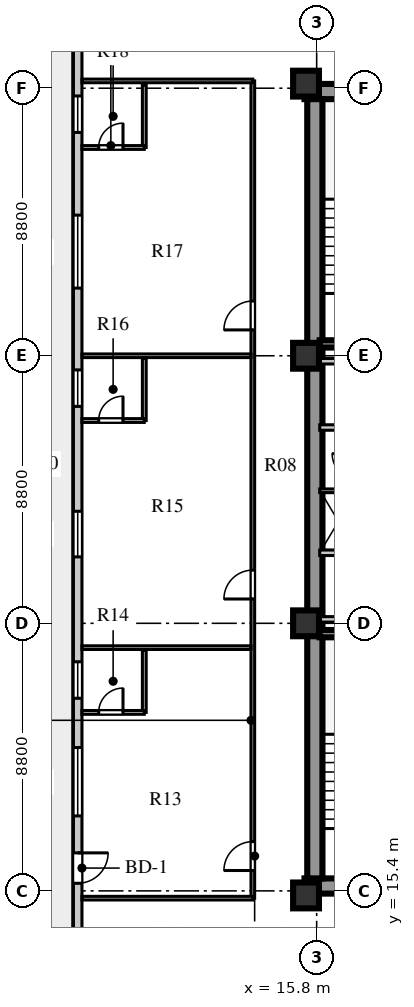
"""IFC4 building model, lengths in metres.
Left out: names, types, materials, properties, quantities, classifications, styles, units other than length and angle.
Written with IfcOpenShell. Run it as: python <this file> out.ifc"""

import sys

from ifc_helpers import new_model, si_unit, direction, frame, frame_2d, origin, origin_2d, place, context, subcontext, project, spatial, rectangle, extrude, element, fill, save


model = new_model("IFC4")
c1 = context("Model", 3, precision=1e-05, world=origin(), true_north=direction((0.0, 1.0)))
c2 = subcontext(c1, "Body", "Model", "MODEL_VIEW")
j1 = project(units=[si_unit("LENGTHUNIT", "METRE"), si_unit("PLANEANGLEUNIT", "RADIAN")], contexts=[c1])
p1 = place(None, origin())
s1 = spatial("IfcSite", under=j1, at=p1, CompositionType="ELEMENT")
p2 = place(p1, origin())
s2 = spatial("IfcBuilding", under=s1, at=p2, CompositionType="ELEMENT")
p3 = place(p2, frame((0.0, 0.0, 173.3)))
s3 = spatial("IfcBuildingStorey", under=s2, at=p3, CompositionType="ELEMENT", Elevation=173.3)
for number, where, z_axis, x_axis in (
    (1, (15.4, 15.56, 0.0), (0.0, 0.0, 1.0), (1.0, 0.0, 0.0)),
    (2, (15.4, 41.69, 0.0), (0.0, 0.0, 1.0), (1.0, 0.0, 0.0)),
):
    element("IfcWall", number, at=place(p3, frame(where, z_axis=z_axis, x_axis=x_axis)), inside=s3, PredefinedType="SHEAR", context=c2, shape_type="SweptSolid", body=[
        extrude(rectangle(XDim=9.68, YDim=0.5, at=frame_2d((4.84, 0.0))), origin(), (0.0, 0.0, 1.0), 3.6),
    ])
p4 = place(p3, frame((15.74, 15.81, 0.0), z_axis=(0.0, 0.0, 1.0), x_axis=(0.0, 1.0, 0.0)))
e3 = element("IfcWall", 3, at=p4, inside=s3, PredefinedType="SHEAR", context=c2, shape_type="SweptSolid", body=[
    extrude(rectangle(XDim=25.63, YDim=0.5, at=frame_2d((12.815, 0.0))), origin(), (0.0, 0.0, 1.0), 3.6),
])
for number, where, z_axis, x_axis in (
    (4, (15.45, 15.25, 0.0), (0.0, 0.0, 1.0), (1.0, 0.0, 0.0)),
    (5, (15.45, 24.2, 0.0), (0.0, 0.0, 1.0), (1.0, 0.0, 0.0)),
    (6, (15.45, 33.0, 0.0), (0.0, 0.0, 1.0), (1.0, 0.0, 0.0)),
    (7, (15.45, 41.95, 0.0), (0.0, 0.0, 1.0), (1.0, 0.0, 0.0)),
):
    element("IfcColumn", number, at=place(p3, frame(where, z_axis=z_axis, x_axis=x_axis)), inside=s3, PredefinedType="COLUMN", context=c2, shape_type="SweptSolid", body=[
        extrude(rectangle(XDim=0.85, YDim=0.85, at=origin_2d()), origin(), (0.0, 0.0, 1.0), 3.6),
    ])
p5 = place(p3, frame((7.94, 44.07, 0.0), z_axis=(0.0, 0.0, 1.0), x_axis=(0.0, -1.0, 0.0)))
e8 = element("IfcWall", 8, at=p5, inside=s3, PredefinedType="STANDARD", context=c2, shape_type="SweptSolid", body=[
    extrude(rectangle(XDim=30.94, YDim=0.28, at=frame_2d((15.47, 0.0))), origin(), (0.0, 0.0, 1.0), 3.6),
])
p6 = place(p5, frame((27.42, 0.0, 0.0)))
e9 = element("IfcOpeningElement", 9, at=p6, cuts=e8, PredefinedType="OPENING", context=c2, shape_type="SweptSolid", body=[
    extrude(rectangle(XDim=1.0, YDim=2.05, at=frame_2d((0.5, 1.025))), frame((0.0, 0.15, 0.0), z_axis=(0.0, -1.0, 0.0), x_axis=(1.0, 0.0, 0.0)), (0.0, 0.0, 1.0), 0.3),
])
p7 = place(p5, frame((23.955, 0.0, 0.8)))
e10 = element("IfcOpeningElement", 10, at=p7, cuts=e8, PredefinedType="OPENING", context=c2, shape_type="SweptSolid", body=[
    extrude(rectangle(XDim=2.25, YDim=2.0, at=frame_2d((1.125, 1.0))), frame((0.0, 0.15, 0.0), z_axis=(0.0, -1.0, 0.0), x_axis=(1.0, 0.0, 0.0)), (0.0, 0.0, 1.0), 0.3),
])
p8 = place(p5, frame((21.135, 0.0, 0.8)))
e11 = element("IfcOpeningElement", 11, at=p8, cuts=e8, PredefinedType="OPENING", context=c2, shape_type="SweptSolid", body=[
    extrude(rectangle(XDim=1.2, YDim=1.75, at=frame_2d((0.6, 0.875))), frame((0.0, 0.15, 0.0), z_axis=(0.0, -1.0, 0.0), x_axis=(1.0, 0.0, 0.0)), (0.0, 0.0, 1.0), 0.3),
])
p9 = place(p5, frame((16.185, 0.0, 0.8)))
e12 = element("IfcOpeningElement", 12, at=p9, cuts=e8, PredefinedType="OPENING", context=c2, shape_type="SweptSolid", body=[
    extrude(rectangle(XDim=1.5, YDim=2.0, at=frame_2d((0.75, 1.0))), frame((0.0, 0.15, 0.0), z_axis=(0.0, -1.0, 0.0), x_axis=(1.0, 0.0, 0.0)), (0.0, 0.0, 1.0), 0.3),
])
p10 = place(p5, frame((11.535, 0.0, 0.8)))
e13 = element("IfcOpeningElement", 13, at=p10, cuts=e8, PredefinedType="OPENING", context=c2, shape_type="SweptSolid", body=[
    extrude(rectangle(XDim=1.2, YDim=1.75, at=frame_2d((0.6, 0.875))), frame((0.0, 0.15, 0.0), z_axis=(0.0, -1.0, 0.0), x_axis=(1.0, 0.0, 0.0)), (0.0, 0.0, 1.0), 0.3),
])
p11 = place(p5, frame((6.445, 0.0, 0.8)))
e14 = element("IfcOpeningElement", 14, at=p11, cuts=e8, PredefinedType="OPENING", context=c2, shape_type="SweptSolid", body=[
    extrude(rectangle(XDim=2.4, YDim=2.05, at=frame_2d((1.2, 1.025))), frame((0.0, 0.15, 0.0), z_axis=(0.0, -1.0, 0.0), x_axis=(1.0, 0.0, 0.0)), (0.0, 0.0, 1.0), 0.3),
])
p12 = place(p5, frame((2.525, 0.0, 0.8)))
e15 = element("IfcOpeningElement", 15, at=p12, cuts=e8, PredefinedType="OPENING", context=c2, shape_type="SweptSolid", body=[
    extrude(rectangle(XDim=1.2, YDim=1.75, at=frame_2d((0.6, 0.875))), frame((0.0, 0.15, 0.0), z_axis=(0.0, -1.0, 0.0), x_axis=(1.0, 0.0, 0.0)), (0.0, 0.0, 1.0), 0.3),
])
p13 = place(p3, frame((15.9, 23.86, 0.0), z_axis=(0.0, 0.0, 1.0), x_axis=(1.0, 0.0, 0.0)))
e16 = element("IfcWall", 16, at=p13, inside=s3, PredefinedType="SHEAR", context=c2, shape_type="SweptSolid", body=[
    extrude(rectangle(XDim=3.52, YDim=0.24, at=frame_2d((1.76, 0.0))), origin(), (0.0, 0.0, 1.0), 3.85),
])
p14 = place(p3, frame((15.9, 26.52, 0.0), z_axis=(0.0, 0.0, 1.0), x_axis=(1.0, 0.0, 0.0)))
e17 = element("IfcWall", 17, at=p14, inside=s3, PredefinedType="SOLIDWALL", context=c2, shape_type="SweptSolid", body=[
    extrude(rectangle(XDim=8.68, YDim=0.18, at=frame_2d((4.34, 0.0))), origin(), (0.0, 0.0, 1.0), 3.6),
])
p15 = place(p14, frame((3.3, 0.0, 0.0)))
e18 = element("IfcOpeningElement", 18, at=p15, cuts=e17, PredefinedType="OPENING", context=c2, shape_type="SweptSolid", body=[
    extrude(rectangle(XDim=0.95, YDim=2.1, at=frame_2d((0.475, 1.05))), frame((0.0, 0.1, 0.0), z_axis=(0.0, -1.0, 0.0), x_axis=(1.0, 0.0, 0.0)), (0.0, 0.0, 1.0), 0.2),
])
p16 = place(p3, frame((15.9, 24.33, 0.0), z_axis=(0.0, 0.0, 1.0), x_axis=(1.0, 0.0, 0.0)))
e19 = element("IfcWall", 19, at=p16, inside=s3, PredefinedType="SOLIDWALL", context=c2, shape_type="SweptSolid", body=[
    extrude(rectangle(XDim=8.68, YDim=0.18, at=frame_2d((4.34, 0.0))), origin(), (0.0, 0.0, 1.0), 2.95),
])
p17 = place(p3, frame((15.9, 28.56, 0.0), z_axis=(0.0, 0.0, 1.0), x_axis=(1.0, 0.0, 0.0)))
e20 = element("IfcWall", 20, at=p17, inside=s3, PredefinedType="PARTITIONING", context=c2, shape_type="SweptSolid", body=[
    extrude(rectangle(XDim=1.2, YDim=0.12, at=frame_2d((0.6, 0.0))), origin(), (0.0, 0.0, 1.0), 3.6),
])
p18 = place(p3, frame((15.9, 30.64, 0.0), z_axis=(0.0, 0.0, 1.0), x_axis=(1.0, 0.0, 0.0)))
e21 = element("IfcWall", 21, at=p18, inside=s3, PredefinedType="SOLIDWALL", context=c2, shape_type="SweptSolid", body=[
    extrude(rectangle(XDim=8.68, YDim=0.18, at=frame_2d((4.34, 0.0))), origin(), (0.0, 0.0, 1.0), 3.6),
])
p19 = place(p18, frame((1.76, 0.0, 0.0)))
e22 = element("IfcOpeningElement", 22, at=p19, cuts=e21, PredefinedType="OPENING", context=c2, shape_type="SweptSolid", body=[
    extrude(rectangle(XDim=1.0, YDim=2.1, at=frame_2d((0.5, 1.05))), frame((0.0, 0.1, 0.0), z_axis=(0.0, -1.0, 0.0), x_axis=(1.0, 0.0, 0.0)), (0.0, 0.0, 1.0), 0.2),
])
p20 = place(p18, frame((3.6, 0.0, 0.0)))
e23 = element("IfcOpeningElement", 23, at=p20, cuts=e21, PredefinedType="OPENING", context=c2, shape_type="SweptSolid", body=[
    extrude(rectangle(XDim=1.0, YDim=2.1, at=frame_2d((0.5, 1.05))), frame((0.0, 0.1, 0.0), z_axis=(0.0, -1.0, 0.0), x_axis=(1.0, 0.0, 0.0)), (0.0, 0.0, 1.0), 0.2),
])
p21 = place(p18, frame((5.44, 0.0, 0.0)))
e24 = element("IfcOpeningElement", 24, at=p21, cuts=e21, PredefinedType="OPENING", context=c2, shape_type="SweptSolid", body=[
    extrude(rectangle(XDim=1.0, YDim=2.1, at=frame_2d((0.5, 1.05))), frame((0.0, 0.1, 0.0), z_axis=(0.0, -1.0, 0.0), x_axis=(1.0, 0.0, 0.0)), (0.0, 0.0, 1.0), 0.2),
])
p22 = place(p18, frame((7.28, 0.0, 0.0)))
e25 = element("IfcOpeningElement", 25, at=p22, cuts=e21, PredefinedType="OPENING", context=c2, shape_type="SweptSolid", body=[
    extrude(rectangle(XDim=1.0, YDim=2.1, at=frame_2d((0.5, 1.05))), frame((0.0, 0.1, 0.0), z_axis=(0.0, -1.0, 0.0), x_axis=(1.0, 0.0, 0.0)), (0.0, 0.0, 1.0), 0.2),
])
p23 = place(p3, frame((15.9, 32.82, 0.0), z_axis=(0.0, 0.0, 1.0), x_axis=(1.0, 0.0, 0.0)))
e26 = element("IfcWall", 26, at=p23, inside=s3, PredefinedType="SOLIDWALL", context=c2, shape_type="SweptSolid", body=[
    extrude(rectangle(XDim=8.68, YDim=0.18, at=frame_2d((4.34, 0.0))), origin(), (0.0, 0.0, 1.0), 2.95),
])
p24 = place(p3, frame((15.9, 33.39, 0.0), z_axis=(0.0, 0.0, 1.0), x_axis=(1.0, 0.0, 0.0)))
e27 = element("IfcWall", 27, at=p24, inside=s3, PredefinedType="SHEAR", context=c2, shape_type="SweptSolid", body=[
    extrude(rectangle(XDim=3.52, YDim=0.24, at=frame_2d((1.76, 0.0))), origin(), (0.0, 0.0, 1.0), 3.85),
])
p25 = place(p3, frame((13.7, 15.16, 0.0), z_axis=(0.0, 0.0, 1.0), x_axis=(0.0, 1.0, 0.0)))
e28 = element("IfcWall", 28, at=p25, inside=s3, PredefinedType="PARTITIONING", context=c2, shape_type="SweptSolid", body=[
    extrude(rectangle(XDim=26.88, YDim=0.12, at=frame_2d((13.44, 0.0))), origin(), (0.0, 0.0, 1.0), 3.6),
])
p26 = place(p25, frame((0.91, 0.0, 0.0)))
e29 = element("IfcOpeningElement", 29, at=p26, cuts=e28, PredefinedType="OPENING", context=c2, shape_type="SweptSolid", body=[
    extrude(rectangle(XDim=0.95, YDim=2.1, at=frame_2d((0.475, 1.05))), frame((0.0, 0.07, 0.0), z_axis=(0.0, -1.0, 0.0), x_axis=(1.0, 0.0, 0.0)), (0.0, 0.0, 1.0), 0.14),
])
p27 = place(p25, frame((9.84, 0.0, 0.0)))
e30 = element("IfcOpeningElement", 30, at=p27, cuts=e28, PredefinedType="OPENING", context=c2, shape_type="SweptSolid", body=[
    extrude(rectangle(XDim=0.95, YDim=2.1, at=frame_2d((0.475, 1.05))), frame((0.0, 0.07, 0.0), z_axis=(0.0, -1.0, 0.0), x_axis=(1.0, 0.0, 0.0)), (0.0, 0.0, 1.0), 0.14),
])
p28 = place(p25, frame((18.69, 0.0, 0.0)))
e31 = element("IfcOpeningElement", 31, at=p28, cuts=e28, PredefinedType="OPENING", context=c2, shape_type="SweptSolid", body=[
    extrude(rectangle(XDim=0.95, YDim=2.1, at=frame_2d((0.475, 1.05))), frame((0.0, 0.07, 0.0), z_axis=(0.0, -1.0, 0.0), x_axis=(1.0, 0.0, 0.0)), (0.0, 0.0, 1.0), 0.14),
])
for number, where, z_axis, x_axis in (
    (32, (8.08, 15.16, 0.0), (0.0, 0.0, 1.0), (1.0, 0.0, 0.0)),
    (33, (8.08, 42.04, 0.0), (0.0, 0.0, 1.0), (1.0, 0.0, 0.0)),
):
    element("IfcWall", number, at=place(p3, frame(where, z_axis=z_axis, x_axis=x_axis)), inside=s3, PredefinedType="PARTITIONING", context=c2, shape_type="SweptSolid", body=[
        extrude(rectangle(XDim=5.62, YDim=0.12, at=frame_2d((2.81, 0.0))), origin(), (0.0, 0.0, 1.0), 3.15),
    ])
p29 = place(p3, frame((10.13, 21.27, 0.0), z_axis=(0.0, 0.0, 1.0), x_axis=(0.0, 1.0, 0.0)))
e34 = element("IfcWall", 34, at=p29, inside=s3, PredefinedType="PLUMBINGWALL", context=c2, shape_type="SweptSolid", body=[
    extrude(rectangle(XDim=2.05, YDim=0.125, at=frame_2d((1.025, 0.0))), origin(), (0.0, 0.0, 1.0), 3.6),
])
p30 = place(p3, frame((8.08, 21.27, 0.0), z_axis=(0.0, 0.0, 1.0), x_axis=(1.0, 0.0, 0.0)))
e35 = element("IfcWall", 35, at=p30, inside=s3, PredefinedType="PLUMBINGWALL", context=c2, shape_type="SweptSolid", body=[
    extrude(rectangle(XDim=2.05, YDim=0.125, at=frame_2d((1.025, 0.0))), origin(), (0.0, 0.0, 1.0), 3.6),
])
p31 = place(p30, frame((0.55, 0.0, 0.0)))
e36 = element("IfcOpeningElement", 36, at=p31, cuts=e35, PredefinedType="OPENING", context=c2, shape_type="SweptSolid", body=[
    extrude(rectangle(XDim=0.8, YDim=2.05, at=frame_2d((0.4, 1.025))), frame((0.0, 0.073, 0.0), z_axis=(0.0, -1.0, 0.0), x_axis=(1.0, 0.0, 0.0)), (0.0, 0.0, 1.0), 0.145),
])
p32 = place(p3, frame((8.08, 23.4, 0.0), z_axis=(0.0, 0.0, 1.0), x_axis=(1.0, 0.0, 0.0)))
e37 = element("IfcWall", 37, at=p32, inside=s3, PredefinedType="PARTITIONING", context=c2, shape_type="SweptSolid", body=[
    extrude(rectangle(XDim=5.56, YDim=0.12, at=frame_2d((2.78, 0.0))), origin(), (0.0, 0.0, 1.0), 3.6),
])
p33 = place(p3, frame((10.13, 30.87, 0.0), z_axis=(0.0, 0.0, 1.0), x_axis=(0.0, 1.0, 0.0)))
e38 = element("IfcWall", 38, at=p33, inside=s3, PredefinedType="PLUMBINGWALL", context=c2, shape_type="SweptSolid", body=[
    extrude(rectangle(XDim=2.05, YDim=0.125, at=frame_2d((1.025, 0.0))), origin(), (0.0, 0.0, 1.0), 3.6),
])
p34 = place(p3, frame((8.08, 30.87, 0.0), z_axis=(0.0, 0.0, 1.0), x_axis=(1.0, 0.0, 0.0)))
e39 = element("IfcWall", 39, at=p34, inside=s3, PredefinedType="PLUMBINGWALL", context=c2, shape_type="SweptSolid", body=[
    extrude(rectangle(XDim=2.05, YDim=0.125, at=frame_2d((1.025, 0.0))), origin(), (0.0, 0.0, 1.0), 3.6),
])
p35 = place(p34, frame((0.55, 0.0, 0.0)))
e40 = element("IfcOpeningElement", 40, at=p35, cuts=e39, PredefinedType="OPENING", context=c2, shape_type="SweptSolid", body=[
    extrude(rectangle(XDim=0.8, YDim=2.05, at=frame_2d((0.4, 1.025))), frame((0.0, 0.073, 0.0), z_axis=(0.0, -1.0, 0.0), x_axis=(1.0, 0.0, 0.0)), (0.0, 0.0, 1.0), 0.145),
])
p36 = place(p3, frame((8.08, 33.0, 0.0), z_axis=(0.0, 0.0, 1.0), x_axis=(1.0, 0.0, 0.0)))
e41 = element("IfcWall", 41, at=p36, inside=s3, PredefinedType="PARTITIONING", context=c2, shape_type="SweptSolid", body=[
    extrude(rectangle(XDim=5.56, YDim=0.12, at=frame_2d((2.78, 0.0))), origin(), (0.0, 0.0, 1.0), 3.15),
])
p37 = place(p3, frame((10.13, 39.85, 0.0), z_axis=(0.0, 0.0, 1.0), x_axis=(0.0, 1.0, 0.0)))
e42 = element("IfcWall", 42, at=p37, inside=s3, PredefinedType="PLUMBINGWALL", context=c2, shape_type="SweptSolid", body=[
    extrude(rectangle(XDim=2.05, YDim=0.125, at=frame_2d((1.025, 0.0))), origin(), (0.0, 0.0, 1.0), 3.6),
])
p38 = place(p3, frame((8.08, 39.85, 0.0), z_axis=(0.0, 0.0, 1.0), x_axis=(1.0, 0.0, 0.0)))
e43 = element("IfcWall", 43, at=p38, inside=s3, PredefinedType="PLUMBINGWALL", context=c2, shape_type="SweptSolid", body=[
    extrude(rectangle(XDim=2.05, YDim=0.125, at=frame_2d((1.025, 0.0))), origin(), (0.0, 0.0, 1.0), 3.6),
])
p39 = place(p38, frame((0.55, 0.0, 0.0)))
e44 = element("IfcOpeningElement", 44, at=p39, cuts=e43, PredefinedType="OPENING", context=c2, shape_type="SweptSolid", body=[
    extrude(rectangle(XDim=0.8, YDim=2.05, at=frame_2d((0.4, 1.025))), frame((0.0, 0.073, 0.0), z_axis=(0.0, -1.0, 0.0), x_axis=(1.0, 0.0, 0.0)), (0.0, 0.0, 1.0), 0.145),
])
p40 = place(p6, frame((1.0, 0.0, 0.0), z_axis=(0.0, 0.0, 1.0), x_axis=(-1.0, 0.0, 0.0)))
e45 = element("IfcDoor", 45, at=p40, inside=s3, OperationType="SINGLE_SWING_RIGHT", PredefinedType="DOOR", context=c2, shape_type="SweptSolid", body=[
    extrude(rectangle(XDim=1.0, YDim=2.05, at=frame_2d((0.5, 1.025))), frame((0.0, 0.025, 0.0), z_axis=(0.0, -1.0, 0.0), x_axis=(1.0, 0.0, 0.0)), (0.0, 0.0, 1.0), 0.05),
])
fill(e9, e45)
p41 = place(p7, origin())
e46 = element("IfcWindow", 46, at=p41, inside=s3, PartitioningType="SINGLE_PANEL", PredefinedType="WINDOW", context=c2, shape_type="SweptSolid", body=[
    extrude(rectangle(XDim=2.25, YDim=2.0, at=frame_2d((1.125, 1.0))), frame((0.0, 0.03, 0.0), z_axis=(0.0, -1.0, 0.0), x_axis=(1.0, 0.0, 0.0)), (0.0, 0.0, 1.0), 0.06),
])
fill(e10, e46)
p42 = place(p8, origin())
e47 = element("IfcWindow", 47, at=p42, inside=s3, PartitioningType="SINGLE_PANEL", PredefinedType="WINDOW", context=c2, shape_type="SweptSolid", body=[
    extrude(rectangle(XDim=1.2, YDim=1.75, at=frame_2d((0.6, 0.875))), frame((0.0, 0.03, 0.0), z_axis=(0.0, -1.0, 0.0), x_axis=(1.0, 0.0, 0.0)), (0.0, 0.0, 1.0), 0.06),
])
fill(e11, e47)
p43 = place(p9, origin())
e48 = element("IfcWindow", 48, at=p43, inside=s3, PartitioningType="SINGLE_PANEL", PredefinedType="WINDOW", context=c2, shape_type="SweptSolid", body=[
    extrude(rectangle(XDim=1.5, YDim=2.0, at=frame_2d((0.75, 1.0))), frame((0.0, 0.03, 0.0), z_axis=(0.0, -1.0, 0.0), x_axis=(1.0, 0.0, 0.0)), (0.0, 0.0, 1.0), 0.06),
])
fill(e12, e48)
p44 = place(p10, origin())
e49 = element("IfcWindow", 49, at=p44, inside=s3, PartitioningType="SINGLE_PANEL", PredefinedType="WINDOW", context=c2, shape_type="SweptSolid", body=[
    extrude(rectangle(XDim=1.2, YDim=1.75, at=frame_2d((0.6, 0.875))), frame((0.0, 0.03, 0.0), z_axis=(0.0, -1.0, 0.0), x_axis=(1.0, 0.0, 0.0)), (0.0, 0.0, 1.0), 0.06),
])
fill(e13, e49)
p45 = place(p11, origin())
e50 = element("IfcWindow", 50, at=p45, inside=s3, PartitioningType="SINGLE_PANEL", PredefinedType="WINDOW", context=c2, shape_type="SweptSolid", body=[
    extrude(rectangle(XDim=2.4, YDim=2.05, at=frame_2d((1.2, 1.025))), frame((0.0, 0.03, 0.0), z_axis=(0.0, -1.0, 0.0), x_axis=(1.0, 0.0, 0.0)), (0.0, 0.0, 1.0), 0.06),
])
fill(e14, e50)
p46 = place(p12, origin())
e51 = element("IfcWindow", 51, at=p46, inside=s3, PartitioningType="SINGLE_PANEL", PredefinedType="WINDOW", context=c2, shape_type="SweptSolid", body=[
    extrude(rectangle(XDim=1.2, YDim=1.75, at=frame_2d((0.6, 0.875))), frame((0.0, 0.03, 0.0), z_axis=(0.0, -1.0, 0.0), x_axis=(1.0, 0.0, 0.0)), (0.0, 0.0, 1.0), 0.06),
])
fill(e15, e51)
p47 = place(p26, origin())
e52 = element("IfcDoor", 52, at=p47, inside=s3, OperationType="SINGLE_SWING_LEFT", PredefinedType="DOOR", context=c2, shape_type="SweptSolid", body=[
    extrude(rectangle(XDim=0.95, YDim=2.1, at=frame_2d((0.475, 1.05))), frame((0.0, 0.025, 0.0), z_axis=(0.0, -1.0, 0.0), x_axis=(1.0, 0.0, 0.0)), (0.0, 0.0, 1.0), 0.05),
])
fill(e29, e52)
p48 = place(p31, frame((0.8, 0.0, 0.0), z_axis=(0.0, 0.0, 1.0), x_axis=(-1.0, 0.0, 0.0)))
e53 = element("IfcDoor", 53, at=p48, inside=s3, OperationType="SINGLE_SWING_LEFT", PredefinedType="DOOR", context=c2, shape_type="SweptSolid", body=[
    extrude(rectangle(XDim=0.8, YDim=2.05, at=frame_2d((0.4, 1.025))), frame((0.0, 0.025, 0.0), z_axis=(0.0, -1.0, 0.0), x_axis=(1.0, 0.0, 0.0)), (0.0, 0.0, 1.0), 0.05),
])
fill(e36, e53)
p49 = place(p27, origin())
e54 = element("IfcDoor", 54, at=p49, inside=s3, OperationType="SINGLE_SWING_LEFT", PredefinedType="DOOR", context=c2, shape_type="SweptSolid", body=[
    extrude(rectangle(XDim=0.95, YDim=2.1, at=frame_2d((0.475, 1.05))), frame((0.0, 0.025, 0.0), z_axis=(0.0, -1.0, 0.0), x_axis=(1.0, 0.0, 0.0)), (0.0, 0.0, 1.0), 0.05),
])
fill(e30, e54)
p50 = place(p35, frame((0.8, 0.0, 0.0), z_axis=(0.0, 0.0, 1.0), x_axis=(-1.0, 0.0, 0.0)))
e55 = element("IfcDoor", 55, at=p50, inside=s3, OperationType="SINGLE_SWING_LEFT", PredefinedType="DOOR", context=c2, shape_type="SweptSolid", body=[
    extrude(rectangle(XDim=0.8, YDim=2.05, at=frame_2d((0.4, 1.025))), frame((0.0, 0.025, 0.0), z_axis=(0.0, -1.0, 0.0), x_axis=(1.0, 0.0, 0.0)), (0.0, 0.0, 1.0), 0.05),
])
fill(e40, e55)
p51 = place(p28, origin())
e56 = element("IfcDoor", 56, at=p51, inside=s3, OperationType="SINGLE_SWING_LEFT", PredefinedType="DOOR", context=c2, shape_type="SweptSolid", body=[
    extrude(rectangle(XDim=0.95, YDim=2.1, at=frame_2d((0.475, 1.05))), frame((0.0, 0.025, 0.0), z_axis=(0.0, -1.0, 0.0), x_axis=(1.0, 0.0, 0.0)), (0.0, 0.0, 1.0), 0.05),
])
fill(e31, e56)
p52 = place(p39, frame((0.8, 0.0, 0.0), z_axis=(0.0, 0.0, 1.0), x_axis=(-1.0, 0.0, 0.0)))
e57 = element("IfcDoor", 57, at=p52, inside=s3, OperationType="SINGLE_SWING_LEFT", PredefinedType="DOOR", context=c2, shape_type="SweptSolid", body=[
    extrude(rectangle(XDim=0.8, YDim=2.05, at=frame_2d((0.4, 1.025))), frame((0.0, 0.025, 0.0), z_axis=(0.0, -1.0, 0.0), x_axis=(1.0, 0.0, 0.0)), (0.0, 0.0, 1.0), 0.05),
])
fill(e44, e57)
save(model, sys.argv[1])
